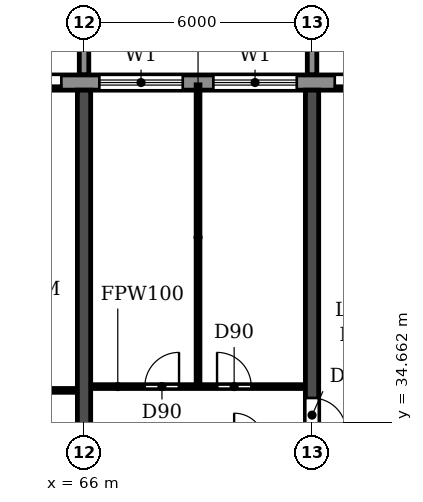
"""IFC4 building model, lengths in metres.
Left out: names, types, materials, properties, quantities, classifications, styles, units other than length and angle.
Written with IfcOpenShell. Run it as: python <this file> out.ifc"""

import sys

from ifc_helpers import new_model, si_unit, direction, frame, frame_2d, origin, place, context, subcontext, project, spatial, polyline, rectangle, outline, extrude, source, transform, mapped, element, fill, save


model = new_model("IFC4")
c1 = context("Model", 3, precision=1e-05, world=origin(), true_north=direction((0.0, 1.0)))
c2 = subcontext(c1, "Body", "Model", "MODEL_VIEW")
j1 = project(units=[si_unit("LENGTHUNIT", "METRE"), si_unit("PLANEANGLEUNIT", "RADIAN")], contexts=[c1])
p1 = place(None, origin())
s1 = spatial("IfcSite", under=j1, at=p1, CompositionType="ELEMENT")
p2 = place(p1, origin())
s2 = spatial("IfcBuilding", under=s1, at=p2, CompositionType="ELEMENT")
p3 = place(p2, frame((0.0, 0.0, 102.6)))
s3 = spatial("IfcBuildingStorey", under=s2, at=p3, CompositionType="ELEMENT", Elevation=102.6)
p4 = place(p3, frame((66.0, 30.525, 0.0), z_axis=(0.0, 0.0, 1.0), x_axis=(0.0, 1.0, 0.0)))
e1 = element("IfcWall", 1, at=p4, inside=s3, PredefinedType="SHEAR", context=c2, shape_type="SweptSolid", body=[
    extrude(rectangle(XDim=12.875, YDim=0.35, at=frame_2d((6.438, 0.0))), origin(), (0.0, 0.0, 1.0), 3.0),
])
p5 = place(p3, frame((72.0, 30.525, 0.0), z_axis=(0.0, 0.0, 1.0), x_axis=(0.0, 1.0, 0.0)))
e2 = element("IfcWall", 2, at=p5, inside=s3, PredefinedType="SHEAR", context=c2, shape_type="SweptSolid", body=[
    extrude(rectangle(XDim=12.875, YDim=0.35, at=frame_2d((6.438, 0.0))), origin(), (0.0, 0.0, 1.0), 3.0),
])
p6 = place(p5, frame((3.875, 0.0, 0.0)))
e3 = element("IfcOpeningElement", 3, at=p6, cuts=e2, PredefinedType="OPENING", context=c2, shape_type="SweptSolid", body=[
    extrude(rectangle(XDim=0.9, YDim=2.1, at=frame_2d((0.45, 1.05))), frame((0.0, 0.185, 0.0), z_axis=(0.0, -1.0, 0.0), x_axis=(1.0, 0.0, 0.0)), (0.0, 0.0, 1.0), 0.37),
])
p7 = place(p3, frame((91.317, 43.6, 0.0), z_axis=(0.0, 0.0, 1.0), x_axis=(-1.0, 0.0, 0.0)))
e4 = element("IfcWall", 4, at=p7, inside=s3, PredefinedType="STANDARD", context=c2, shape_type="SweptSolid", body=[
    extrude(rectangle(XDim=80.634, YDim=0.4, at=frame_2d((40.317, 0.0))), origin(), (0.0, 0.0, 1.0), 3.0),
])
p8 = place(p7, frame((76.717, 0.0, 0.9)))
e5 = element("IfcOpeningElement", 5, at=p8, cuts=e4, PredefinedType="OPENING", context=c2, shape_type="SweptSolid", body=[
    extrude(rectangle(XDim=2.2, YDim=1.5, at=frame_2d((1.1, 0.75))), frame((0.0, 0.21, 0.0), z_axis=(0.0, -1.0, 0.0), x_axis=(1.0, 0.0, 0.0)), (0.0, 0.0, 1.0), 0.42),
])
p9 = place(p7, frame((73.917, 0.0, 0.0)))
e6 = element("IfcOpeningElement", 6, at=p9, cuts=e4, PredefinedType="OPENING", context=c2, shape_type="SweptSolid", body=[
    extrude(rectangle(XDim=1.8, YDim=2.4, at=frame_2d((0.9, 1.2))), frame((0.0, 0.21, 0.0), z_axis=(0.0, -1.0, 0.0), x_axis=(1.0, 0.0, 0.0)), (0.0, 0.0, 1.0), 0.42),
])
p10 = place(p7, frame((70.717, 0.0, 0.9)))
e7 = element("IfcOpeningElement", 7, at=p10, cuts=e4, PredefinedType="OPENING", context=c2, shape_type="SweptSolid", body=[
    extrude(rectangle(XDim=2.2, YDim=1.5, at=frame_2d((1.1, 0.75))), frame((0.0, 0.21, 0.0), z_axis=(0.0, -1.0, 0.0), x_axis=(1.0, 0.0, 0.0)), (0.0, 0.0, 1.0), 0.42),
])
p11 = place(p7, frame((67.717, 0.0, 0.9)))
e8 = element("IfcOpeningElement", 8, at=p11, cuts=e4, PredefinedType="OPENING", context=c2, shape_type="SweptSolid", body=[
    extrude(rectangle(XDim=2.2, YDim=1.5, at=frame_2d((1.1, 0.75))), frame((0.0, 0.21, 0.0), z_axis=(0.0, -1.0, 0.0), x_axis=(1.0, 0.0, 0.0)), (0.0, 0.0, 1.0), 0.42),
])
p12 = place(p7, frame((64.917, 0.0, 0.0)))
e9 = element("IfcOpeningElement", 9, at=p12, cuts=e4, PredefinedType="OPENING", context=c2, shape_type="SweptSolid", body=[
    extrude(rectangle(XDim=1.8, YDim=2.4, at=frame_2d((0.9, 1.2))), frame((0.0, 0.21, 0.0), z_axis=(0.0, -1.0, 0.0), x_axis=(1.0, 0.0, 0.0)), (0.0, 0.0, 1.0), 0.42),
])
p13 = place(p7, frame((61.717, 0.0, 0.9)))
e10 = element("IfcOpeningElement", 10, at=p13, cuts=e4, PredefinedType="OPENING", context=c2, shape_type="SweptSolid", body=[
    extrude(rectangle(XDim=2.2, YDim=1.5, at=frame_2d((1.1, 0.75))), frame((0.0, 0.21, 0.0), z_axis=(0.0, -1.0, 0.0), x_axis=(1.0, 0.0, 0.0)), (0.0, 0.0, 1.0), 0.42),
])
p14 = place(p7, frame((58.717, 0.0, 0.9)))
e11 = element("IfcOpeningElement", 11, at=p14, cuts=e4, PredefinedType="OPENING", context=c2, shape_type="SweptSolid", body=[
    extrude(rectangle(XDim=2.2, YDim=1.5, at=frame_2d((1.1, 0.75))), frame((0.0, 0.21, 0.0), z_axis=(0.0, -1.0, 0.0), x_axis=(1.0, 0.0, 0.0)), (0.0, 0.0, 1.0), 0.42),
])
p15 = place(p7, frame((55.717, 0.0, 0.9)))
e12 = element("IfcOpeningElement", 12, at=p15, cuts=e4, PredefinedType="OPENING", context=c2, shape_type="SweptSolid", body=[
    extrude(rectangle(XDim=2.2, YDim=1.5, at=frame_2d((1.1, 0.75))), frame((0.0, 0.21, 0.0), z_axis=(0.0, -1.0, 0.0), x_axis=(1.0, 0.0, 0.0)), (0.0, 0.0, 1.0), 0.42),
])
p16 = place(p7, frame((52.717, 0.0, 0.9)))
e13 = element("IfcOpeningElement", 13, at=p16, cuts=e4, PredefinedType="OPENING", context=c2, shape_type="SweptSolid", body=[
    extrude(rectangle(XDim=2.2, YDim=1.5, at=frame_2d((1.1, 0.75))), frame((0.0, 0.21, 0.0), z_axis=(0.0, -1.0, 0.0), x_axis=(1.0, 0.0, 0.0)), (0.0, 0.0, 1.0), 0.42),
])
p17 = place(p7, frame((49.917, 0.0, 0.0)))
e14 = element("IfcOpeningElement", 14, at=p17, cuts=e4, PredefinedType="OPENING", context=c2, shape_type="SweptSolid", body=[
    extrude(rectangle(XDim=1.8, YDim=2.4, at=frame_2d((0.9, 1.2))), frame((0.0, 0.21, 0.0), z_axis=(0.0, -1.0, 0.0), x_axis=(1.0, 0.0, 0.0)), (0.0, 0.0, 1.0), 0.42),
])
p18 = place(p7, frame((46.717, 0.0, 0.9)))
e15 = element("IfcOpeningElement", 15, at=p18, cuts=e4, PredefinedType="OPENING", context=c2, shape_type="SweptSolid", body=[
    extrude(rectangle(XDim=2.2, YDim=1.5, at=frame_2d((1.1, 0.75))), frame((0.0, 0.21, 0.0), z_axis=(0.0, -1.0, 0.0), x_axis=(1.0, 0.0, 0.0)), (0.0, 0.0, 1.0), 0.42),
])
p19 = place(p7, frame((43.917, 0.0, 0.0)))
e16 = element("IfcOpeningElement", 16, at=p19, cuts=e4, PredefinedType="OPENING", context=c2, shape_type="SweptSolid", body=[
    extrude(rectangle(XDim=1.8, YDim=2.4, at=frame_2d((0.9, 1.2))), frame((0.0, 0.21, 0.0), z_axis=(0.0, -1.0, 0.0), x_axis=(1.0, 0.0, 0.0)), (0.0, 0.0, 1.0), 0.42),
])
p20 = place(p7, frame((40.717, 0.0, 0.9)))
e17 = element("IfcOpeningElement", 17, at=p20, cuts=e4, PredefinedType="OPENING", context=c2, shape_type="SweptSolid", body=[
    extrude(rectangle(XDim=2.2, YDim=1.5, at=frame_2d((1.1, 0.75))), frame((0.0, 0.21, 0.0), z_axis=(0.0, -1.0, 0.0), x_axis=(1.0, 0.0, 0.0)), (0.0, 0.0, 1.0), 0.42),
])
p21 = place(p7, frame((37.717, 0.0, 0.9)))
e18 = element("IfcOpeningElement", 18, at=p21, cuts=e4, PredefinedType="OPENING", context=c2, shape_type="SweptSolid", body=[
    extrude(rectangle(XDim=2.2, YDim=1.5, at=frame_2d((1.1, 0.75))), frame((0.0, 0.21, 0.0), z_axis=(0.0, -1.0, 0.0), x_axis=(1.0, 0.0, 0.0)), (0.0, 0.0, 1.0), 0.42),
])
p22 = place(p7, frame((34.917, 0.0, 0.0)))
e19 = element("IfcOpeningElement", 19, at=p22, cuts=e4, PredefinedType="OPENING", context=c2, shape_type="SweptSolid", body=[
    extrude(rectangle(XDim=1.8, YDim=2.4, at=frame_2d((0.9, 1.2))), frame((0.0, 0.21, 0.0), z_axis=(0.0, -1.0, 0.0), x_axis=(1.0, 0.0, 0.0)), (0.0, 0.0, 1.0), 0.42),
])
p23 = place(p7, frame((31.717, 0.0, 0.9)))
e20 = element("IfcOpeningElement", 20, at=p23, cuts=e4, PredefinedType="OPENING", context=c2, shape_type="SweptSolid", body=[
    extrude(rectangle(XDim=2.2, YDim=1.5, at=frame_2d((1.1, 0.75))), frame((0.0, 0.21, 0.0), z_axis=(0.0, -1.0, 0.0), x_axis=(1.0, 0.0, 0.0)), (0.0, 0.0, 1.0), 0.42),
])
p24 = place(p7, frame((28.717, 0.0, 0.9)))
e21 = element("IfcOpeningElement", 21, at=p24, cuts=e4, PredefinedType="OPENING", context=c2, shape_type="SweptSolid", body=[
    extrude(rectangle(XDim=2.2, YDim=1.5, at=frame_2d((1.1, 0.75))), frame((0.0, 0.21, 0.0), z_axis=(0.0, -1.0, 0.0), x_axis=(1.0, 0.0, 0.0)), (0.0, 0.0, 1.0), 0.42),
])
p25 = place(p7, frame((25.917, 0.0, 0.0)))
e22 = element("IfcOpeningElement", 22, at=p25, cuts=e4, PredefinedType="OPENING", context=c2, shape_type="SweptSolid", body=[
    extrude(rectangle(XDim=1.8, YDim=2.4, at=frame_2d((0.9, 1.2))), frame((0.0, 0.21, 0.0), z_axis=(0.0, -1.0, 0.0), x_axis=(1.0, 0.0, 0.0)), (0.0, 0.0, 1.0), 0.42),
])
p26 = place(p7, frame((22.717, 0.0, 0.9)))
e23 = element("IfcOpeningElement", 23, at=p26, cuts=e4, PredefinedType="OPENING", context=c2, shape_type="SweptSolid", body=[
    extrude(rectangle(XDim=2.2, YDim=1.5, at=frame_2d((1.1, 0.75))), frame((0.0, 0.21, 0.0), z_axis=(0.0, -1.0, 0.0), x_axis=(1.0, 0.0, 0.0)), (0.0, 0.0, 1.0), 0.42),
])
p27 = place(p7, frame((19.717, 0.0, 0.9)))
e24 = element("IfcOpeningElement", 24, at=p27, cuts=e4, PredefinedType="OPENING", context=c2, shape_type="SweptSolid", body=[
    extrude(rectangle(XDim=2.2, YDim=1.5, at=frame_2d((1.1, 0.75))), frame((0.0, 0.21, 0.0), z_axis=(0.0, -1.0, 0.0), x_axis=(1.0, 0.0, 0.0)), (0.0, 0.0, 1.0), 0.42),
])
p28 = place(p7, frame((16.917, 0.0, 0.0)))
e25 = element("IfcOpeningElement", 25, at=p28, cuts=e4, PredefinedType="OPENING", context=c2, shape_type="SweptSolid", body=[
    extrude(rectangle(XDim=1.8, YDim=2.4, at=frame_2d((0.9, 1.2))), frame((0.0, 0.21, 0.0), z_axis=(0.0, -1.0, 0.0), x_axis=(1.0, 0.0, 0.0)), (0.0, 0.0, 1.0), 0.42),
])
p29 = place(p7, frame((13.717, 0.0, 0.9)))
e26 = element("IfcOpeningElement", 26, at=p29, cuts=e4, PredefinedType="OPENING", context=c2, shape_type="SweptSolid", body=[
    extrude(rectangle(XDim=2.2, YDim=1.5, at=frame_2d((1.1, 0.75))), frame((0.0, 0.21, 0.0), z_axis=(0.0, -1.0, 0.0), x_axis=(1.0, 0.0, 0.0)), (0.0, 0.0, 1.0), 0.42),
])
p30 = place(p7, frame((10.917, 0.0, 0.0)))
e27 = element("IfcOpeningElement", 27, at=p30, cuts=e4, PredefinedType="OPENING", context=c2, shape_type="SweptSolid", body=[
    extrude(rectangle(XDim=1.8, YDim=2.4, at=frame_2d((0.9, 1.2))), frame((0.0, 0.21, 0.0), z_axis=(0.0, -1.0, 0.0), x_axis=(1.0, 0.0, 0.0)), (0.0, 0.0, 1.0), 0.42),
])
p31 = place(p7, frame((7.717, 0.0, 0.9)))
e28 = element("IfcOpeningElement", 28, at=p31, cuts=e4, PredefinedType="OPENING", context=c2, shape_type="SweptSolid", body=[
    extrude(rectangle(XDim=2.2, YDim=1.5, at=frame_2d((1.1, 0.75))), frame((0.0, 0.21, 0.0), z_axis=(0.0, -1.0, 0.0), x_axis=(1.0, 0.0, 0.0)), (0.0, 0.0, 1.0), 0.42),
])
p32 = place(p7, frame((4.717, 0.0, 0.9)))
e29 = element("IfcOpeningElement", 29, at=p32, cuts=e4, PredefinedType="OPENING", context=c2, shape_type="SweptSolid", body=[
    extrude(rectangle(XDim=2.2, YDim=1.5, at=frame_2d((1.1, 0.75))), frame((0.0, 0.21, 0.0), z_axis=(0.0, -1.0, 0.0), x_axis=(1.0, 0.0, 0.0)), (0.0, 0.0, 1.0), 0.42),
])
p33 = place(p7, frame((1.917, 0.0, 0.0)))
e30 = element("IfcOpeningElement", 30, at=p33, cuts=e4, PredefinedType="OPENING", context=c2, shape_type="SweptSolid", body=[
    extrude(rectangle(XDim=1.8, YDim=2.4, at=frame_2d((0.9, 1.2))), frame((0.0, 0.21, 0.0), z_axis=(0.0, -1.0, 0.0), x_axis=(1.0, 0.0, 0.0)), (0.0, 0.0, 1.0), 0.42),
])
m1 = source(origin(), c2, "Body", "SweptSolid", [
    extrude(outline(polyline([(0.0, 0.0), (0.25, 0.0), (0.25, 3.1), (0.0, 3.1), (0.0, 0.0)])), origin(), (0.0, 0.0, 1.0), 3.1),
])
for number, where in (
    (31, (65.875, 43.8, 0.0)),
    (32, (71.875, 43.8, 0.0)),
):
    element("IfcWall", number, at=place(p3, frame(where)), inside=s3, PredefinedType="STANDARD", context=c2, shape_type="MappedRepresentation", body=[
        mapped(m1, transform((0.0, 0.0, 0.0))),
    ])
p34 = place(p3, frame((63.8, 35.5, 0.0), z_axis=(0.0, 0.0, 1.0), x_axis=(1.0, 0.0, 0.0)))
e33 = element("IfcWall", 33, at=p34, inside=s3, PredefinedType="PARTITIONING", context=c2, shape_type="SweptSolid", body=[
    extrude(rectangle(XDim=2.015, YDim=0.1, at=frame_2d((1.007, 0.0))), origin(), (0.0, 0.0, 1.0), 3.0),
])
p35 = place(p3, frame((66.185, 35.6, 0.0), z_axis=(0.0, 0.0, 1.0), x_axis=(1.0, 0.0, 0.0)))
e34 = element("IfcWall", 34, at=p35, inside=s3, PredefinedType="PARTITIONING", context=c2, shape_type="SweptSolid", body=[
    extrude(rectangle(XDim=5.63, YDim=0.1, at=frame_2d((2.815, 0.0))), origin(), (0.0, 0.0, 1.0), 3.0),
])
p36 = place(p35, frame((1.415, 0.0, 0.0)))
e35 = element("IfcOpeningElement", 35, at=p36, cuts=e34, PredefinedType="OPENING", context=c2, shape_type="SweptSolid", body=[
    extrude(rectangle(XDim=0.9, YDim=2.1, at=frame_2d((0.45, 1.05))), frame((0.0, 0.06, 0.0), z_axis=(0.0, -1.0, 0.0), x_axis=(1.0, 0.0, 0.0)), (0.0, 0.0, 1.0), 0.12),
])
p37 = place(p35, frame((3.315, 0.0, 0.0)))
e36 = element("IfcOpeningElement", 36, at=p37, cuts=e34, PredefinedType="OPENING", context=c2, shape_type="SweptSolid", body=[
    extrude(rectangle(XDim=0.9, YDim=2.1, at=frame_2d((0.45, 1.05))), frame((0.0, 0.06, 0.0), z_axis=(0.0, -1.0, 0.0), x_axis=(1.0, 0.0, 0.0)), (0.0, 0.0, 1.0), 0.12),
])
p38 = place(p3, frame((69.0, 35.65, 0.0), z_axis=(0.0, 0.0, 1.0), x_axis=(0.0, 1.0, 0.0)))
e37 = element("IfcWall", 37, at=p38, inside=s3, PredefinedType="PARTITIONING", context=c2, shape_type="SweptSolid", body=[
    extrude(rectangle(XDim=7.89, YDim=0.1, at=frame_2d((3.945, 0.0))), origin(), (0.0, 0.0, 1.0), 3.0),
])
p39 = place(p25, origin())
e38 = element("IfcDoor", 38, at=p39, inside=s3, OperationType="DOUBLE_DOOR_SLIDING", PredefinedType="DOOR", context=c2, shape_type="SweptSolid", body=[
    extrude(rectangle(XDim=1.8, YDim=2.4, at=frame_2d((0.9, 1.2))), frame((0.0, 0.025, 0.0), z_axis=(0.0, -1.0, 0.0), x_axis=(1.0, 0.0, 0.0)), (0.0, 0.0, 1.0), 0.05),
])
fill(e22, e38)
p40 = place(p26, origin())
e39 = element("IfcWindow", 39, at=p40, inside=s3, PartitioningType="DOUBLE_PANEL_HORIZONTAL", PredefinedType="WINDOW", context=c2, shape_type="SweptSolid", body=[
    extrude(rectangle(XDim=2.2, YDim=1.5, at=frame_2d((1.1, 0.75))), frame((0.0, 0.03, 0.0), z_axis=(0.0, -1.0, 0.0), x_axis=(1.0, 0.0, 0.0)), (0.0, 0.0, 1.0), 0.06),
])
fill(e23, e39)
p41 = place(p27, origin())
e40 = element("IfcWindow", 40, at=p41, inside=s3, PartitioningType="DOUBLE_PANEL_HORIZONTAL", PredefinedType="WINDOW", context=c2, shape_type="SweptSolid", body=[
    extrude(rectangle(XDim=2.2, YDim=1.5, at=frame_2d((1.1, 0.75))), frame((0.0, 0.03, 0.0), z_axis=(0.0, -1.0, 0.0), x_axis=(1.0, 0.0, 0.0)), (0.0, 0.0, 1.0), 0.06),
])
fill(e24, e40)
p42 = place(p28, origin())
e41 = element("IfcDoor", 41, at=p42, inside=s3, OperationType="DOUBLE_DOOR_SLIDING", PredefinedType="DOOR", context=c2, shape_type="SweptSolid", body=[
    extrude(rectangle(XDim=1.8, YDim=2.4, at=frame_2d((0.9, 1.2))), frame((0.0, 0.025, 0.0), z_axis=(0.0, -1.0, 0.0), x_axis=(1.0, 0.0, 0.0)), (0.0, 0.0, 1.0), 0.05),
])
fill(e25, e41)
p43 = place(p36, origin())
e42 = element("IfcDoor", 42, at=p43, inside=s3, OperationType="SINGLE_SWING_RIGHT", PredefinedType="DOOR", context=c2, shape_type="SweptSolid", body=[
    extrude(rectangle(XDim=0.9, YDim=2.1, at=frame_2d((0.45, 1.05))), frame((0.0, 0.025, 0.0), z_axis=(0.0, -1.0, 0.0), x_axis=(1.0, 0.0, 0.0)), (0.0, 0.0, 1.0), 0.05),
])
fill(e35, e42)
p44 = place(p37, origin())
e43 = element("IfcDoor", 43, at=p44, inside=s3, OperationType="SINGLE_SWING_LEFT", PredefinedType="DOOR", context=c2, shape_type="SweptSolid", body=[
    extrude(rectangle(XDim=0.9, YDim=2.1, at=frame_2d((0.45, 1.05))), frame((0.0, 0.025, 0.0), z_axis=(0.0, -1.0, 0.0), x_axis=(1.0, 0.0, 0.0)), (0.0, 0.0, 1.0), 0.05),
])
fill(e36, e43)
p45 = place(p6, frame((0.9, 0.0, 0.0), z_axis=(0.0, 0.0, 1.0), x_axis=(-1.0, 0.0, 0.0)))
e44 = element("IfcDoor", 44, at=p45, inside=s3, OperationType="SINGLE_SWING_RIGHT", PredefinedType="DOOR", context=c2, shape_type="SweptSolid", body=[
    extrude(rectangle(XDim=0.9, YDim=2.1, at=frame_2d((0.45, 1.05))), frame((0.0, 0.025, 0.0), z_axis=(0.0, -1.0, 0.0), x_axis=(1.0, 0.0, 0.0)), (0.0, 0.0, 1.0), 0.05),
])
fill(e3, e44)
save(model, sys.argv[1])
